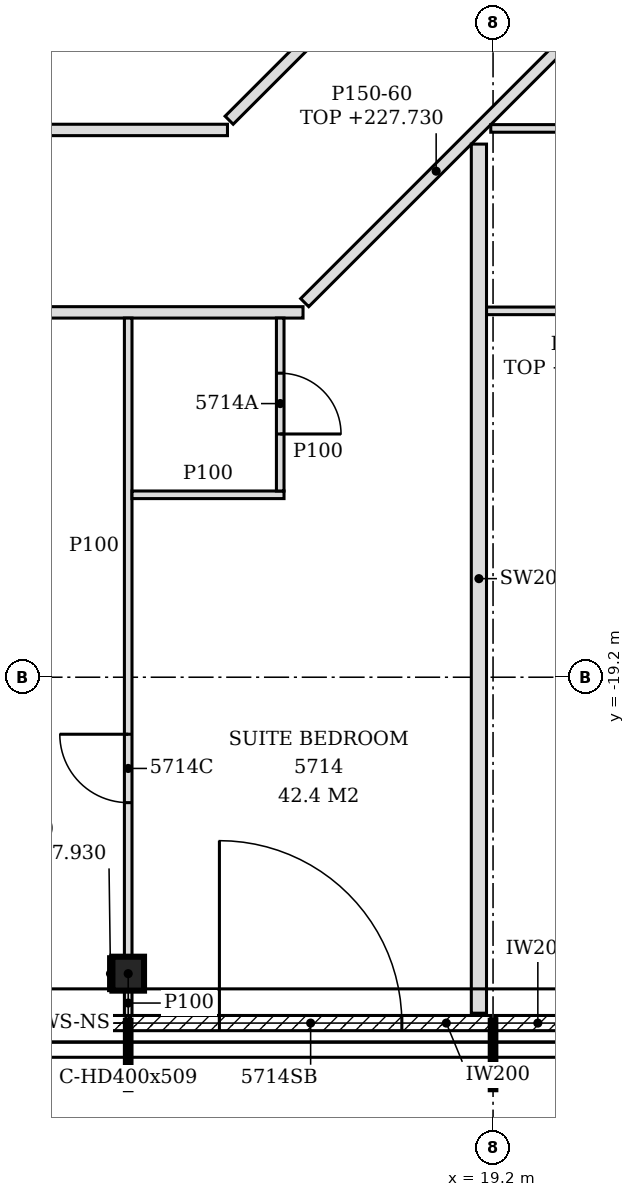
"""IFC4 building model, lengths in metres.
Left out: names, types, materials, properties, quantities, classifications, styles, units other than length and angle.
Written with IfcOpenShell. Run it as: python <this file> out.ifc"""

import sys

from ifc_helpers import new_model, si_unit, direction, frame, frame_2d, origin, origin_2d, place, context, subcontext, project, spatial, polyline, rectangle, i_section, outline, extrude, element, fill, save


model = new_model("IFC4")
c1 = context("Model", 3, precision=1e-05, world=origin(), true_north=direction((0.0, 1.0)))
c2 = subcontext(c1, "Body", "Model", "MODEL_VIEW")
j1 = project(units=[si_unit("LENGTHUNIT", "METRE"), si_unit("PLANEANGLEUNIT", "RADIAN")], contexts=[c1])
p1 = place(None, origin())
s1 = spatial("IfcSite", under=j1, at=p1, CompositionType="ELEMENT")
p2 = place(p1, origin())
s2 = spatial("IfcBuilding", under=s1, at=p2, CompositionType="ELEMENT")
p3 = place(p2, frame((0.0, 0.0, 225.0)))
s3 = spatial("IfcBuildingStorey", under=s2, at=p3, CompositionType="ELEMENT", Elevation=225.0)
p4 = place(p3, frame((14.4, -23.1, -0.15), z_axis=(0.0, 0.0, 1.0), x_axis=(1.0, 0.0, 0.0)))
e1 = element("IfcColumn", 1, at=p4, inside=s3, PredefinedType="COLUMN", context=c2, shape_type="SweptSolid", body=[
    extrude(i_section(OverallWidth=0.416, OverallDepth=0.446, WebThickness=0.039, FlangeThickness=0.063, FilletRadius=0.015, at=origin_2d()), origin(), (0.0, 0.0, 1.0), 3.6),
])
p5 = place(p3, frame((9.63, -23.75, 0.0), z_axis=(0.0, 0.0, 1.0), x_axis=(1.0, 0.0, 0.0)))
e2 = element("IfcWall", 2, at=p5, inside=s3, PredefinedType="NOTDEFINED", context=c2, shape_type="SweptSolid", body=[
    extrude(rectangle(XDim=4.74, YDim=0.2, at=frame_2d((2.37, 0.0))), origin(), (0.0, 0.0, 1.0), 3.45),
])
p6 = place(p5, frame((1.17, 0.0, 0.0)))
e3 = element("IfcOpeningElement", 3, at=p6, cuts=e2, PredefinedType="OPENING", context=c2, shape_type="SweptSolid", body=[
    extrude(rectangle(XDim=2.4, YDim=2.4, at=frame_2d((1.2, 1.2))), frame((0.0, 0.11, 0.0), z_axis=(0.0, -1.0, 0.0), x_axis=(1.0, 0.0, 0.0)), (0.0, 0.0, 1.0), 0.22),
])
p7 = place(p3, frame((14.43, -23.75, 0.0), z_axis=(0.0, 0.0, 1.0), x_axis=(1.0, 0.0, 0.0)))
e4 = element("IfcWall", 4, at=p7, inside=s3, PredefinedType="NOTDEFINED", context=c2, shape_type="SweptSolid", body=[
    extrude(rectangle(XDim=4.74, YDim=0.2, at=frame_2d((2.37, 0.0))), origin(), (0.0, 0.0, 1.0), 3.45),
])
p8 = place(p7, frame((1.17, 0.0, 0.0)))
e5 = element("IfcOpeningElement", 5, at=p8, cuts=e4, PredefinedType="OPENING", context=c2, shape_type="SweptSolid", body=[
    extrude(rectangle(XDim=2.4, YDim=2.4, at=frame_2d((1.2, 1.2))), frame((0.0, 0.11, 0.0), z_axis=(0.0, -1.0, 0.0), x_axis=(1.0, 0.0, 0.0)), (0.0, 0.0, 1.0), 0.22),
])
p9 = place(p3, frame((19.23, -23.75, 0.0), z_axis=(0.0, 0.0, 1.0), x_axis=(1.0, 0.0, 0.0)))
e6 = element("IfcWall", 6, at=p9, inside=s3, PredefinedType="NOTDEFINED", context=c2, shape_type="SweptSolid", body=[
    extrude(rectangle(XDim=4.626, YDim=0.2, at=frame_2d((2.313, 0.0))), origin(), (0.0, 0.0, 1.0), 3.45),
])
p10 = place(p9, frame((1.119, 0.0, 0.0)))
e7 = element("IfcOpeningElement", 7, at=p10, cuts=e6, PredefinedType="OPENING", context=c2, shape_type="SweptSolid", body=[
    extrude(rectangle(XDim=2.4, YDim=2.4, at=frame_2d((1.2, 1.2))), frame((0.0, 0.11, 0.0), z_axis=(0.0, -1.0, 0.0), x_axis=(1.0, 0.0, 0.0)), (0.0, 0.0, 1.0), 0.22),
])
p11 = place(p3, frame((14.4, -23.65, 0.0), z_axis=(0.0, 0.0, 1.0), x_axis=(0.0, 1.0, 0.0)))
e8 = element("IfcWall", 8, at=p11, inside=s3, PredefinedType="PARTITIONING", context=c2, shape_type="SweptSolid", body=[
    extrude(rectangle(XDim=0.327, YDim=0.1, at=frame_2d((0.164, 0.0))), origin(), (0.0, 0.0, 1.0), 3.45),
])
p12 = place(p3, frame((19.014, -23.62, 0.0), z_axis=(0.0, 0.0, 1.0), x_axis=(0.0, 1.0, 0.0)))
e9 = element("IfcWall", 9, at=p12, inside=s3, PredefinedType="PARTITIONING", context=c2, shape_type="SweptSolid", body=[
    extrude(outline(polyline([(0.0, 0.0), (11.434, 0.0), (11.434, 2.73), (0.64, 2.73), (0.638, 2.93), (0.37, 2.93), (0.368, 3.45), (0.0, 3.45), (0.0, 0.0)])), frame((0.0, 0.1, 0.0), z_axis=(0.0, -1.0, 0.0), x_axis=(1.0, 0.0, 0.0)), (0.0, 0.0, 1.0), 0.2),
])
p13 = place(p3, frame((14.4, -22.877, 0.0), z_axis=(0.0, 0.0, 1.0), x_axis=(0.0, 1.0, 0.0)))
e10 = element("IfcWall", 10, at=p13, inside=s3, PredefinedType="PARTITIONING", context=c2, shape_type="SweptSolid", body=[
    extrude(outline(polyline([(0.0, 0.0), (8.402, 0.0), (8.402, 2.88), (8.372, 2.88), (8.37, 3.45), (3.782, 3.45), (3.78, 2.88), (3.572, 2.88), (3.57, 3.45), (0.0, 3.45), (0.0, 0.0)])), frame((0.0, 0.05, 0.0), z_axis=(0.0, -1.0, 0.0), x_axis=(1.0, 0.0, 0.0)), (0.0, 0.0, 1.0), 0.1),
])
p14 = place(p13, frame((2.027, 0.0, 0.0)))
e11 = element("IfcOpeningElement", 11, at=p14, cuts=e10, PredefinedType="OPENING", context=c2, shape_type="SweptSolid", body=[
    extrude(rectangle(XDim=0.9, YDim=2.1, at=frame_2d((0.45, 1.05))), frame((0.0, 0.06, 0.0), z_axis=(0.0, -1.0, 0.0), x_axis=(1.0, 0.0, 0.0)), (0.0, 0.0, 1.0), 0.12),
])
p15 = place(p3, frame((14.45, -16.8, 0.0), z_axis=(0.0, 0.0, 1.0), x_axis=(1.0, 0.0, 0.0)))
e12 = element("IfcWall", 12, at=p15, inside=s3, PredefinedType="PARTITIONING", context=c2, shape_type="SweptSolid", body=[
    extrude(rectangle(XDim=2.0, YDim=0.1, at=frame_2d((1.0, 0.0))), origin(), (0.0, 0.0, 1.0), 3.45),
])
p16 = place(p3, frame((16.4, -16.75, 0.0), z_axis=(0.0, 0.0, 1.0), x_axis=(0.0, 1.0, 0.0)))
e13 = element("IfcWall", 13, at=p16, inside=s3, PredefinedType="PARTITIONING", context=c2, shape_type="SweptSolid", body=[
    extrude(outline(polyline([(0.0, 0.0), (2.275, 0.0), (2.275, 2.88), (2.245, 2.88), (2.243, 3.45), (0.0, 3.45), (0.0, 0.0)])), frame((0.0, 0.05, 0.0), z_axis=(0.0, -1.0, 0.0), x_axis=(1.0, 0.0, 0.0)), (0.0, 0.0, 1.0), 0.1),
])
p17 = place(p16, frame((0.75, 0.0, 0.0)))
e14 = element("IfcOpeningElement", 14, at=p17, cuts=e13, PredefinedType="OPENING", context=c2, shape_type="SweptSolid", body=[
    extrude(rectangle(XDim=0.8, YDim=2.1, at=frame_2d((0.4, 1.05))), frame((0.0, 0.06, 0.0), z_axis=(0.0, -1.0, 0.0), x_axis=(1.0, 0.0, 0.0)), (0.0, 0.0, 1.0), 0.12),
])
p18 = place(p3, frame((-4.326, -14.4, 0.0), z_axis=(0.0, 0.0, 1.0), x_axis=(1.0, 0.0, 0.0)))
e15 = element("IfcWall", 15, at=p18, inside=s3, PredefinedType="PARTITIONING", context=c2, shape_type="SweptSolid", body=[
    extrude(outline(polyline([(0.0, 0.0), (21.026, 0.0), (21.026, 2.88), (11.676, 2.88), (11.674, 2.73), (11.376, 2.73), (11.374, 2.88), (1.369, 2.88), (1.367, 2.63), (0.229, 2.63), (0.227, 2.88), (0.0, 2.88), (0.0, 0.0)])), frame((0.0, 0.075, 0.0), z_axis=(0.0, -1.0, 0.0), x_axis=(1.0, 0.0, 0.0)), (0.0, 0.0, 1.0), 0.15),
])
p19 = place(p18, frame((5.169, 0.0, 0.0)))
e16 = element("IfcOpeningElement", 16, at=p19, cuts=e15, PredefinedType="OPENING", context=c2, shape_type="SweptSolid", body=[
    extrude(rectangle(XDim=0.9, YDim=2.1, at=frame_2d((0.45, 1.05))), frame((0.0, 0.085, 0.0), z_axis=(0.0, -1.0, 0.0), x_axis=(1.0, 0.0, 0.0)), (0.0, 0.0, 1.0), 0.17),
])
p20 = place(p18, frame((15.969, 0.0, 0.0)))
e17 = element("IfcOpeningElement", 17, at=p20, cuts=e15, PredefinedType="OPENING", context=c2, shape_type="SweptSolid", body=[
    extrude(rectangle(XDim=0.9, YDim=2.1, at=frame_2d((0.45, 1.05))), frame((0.0, 0.085, 0.0), z_axis=(0.0, -1.0, 0.0), x_axis=(1.0, 0.0, 0.0)), (0.0, 0.0, 1.0), 0.17),
])
p21 = place(p3, frame((19.114, -14.38, 0.0), z_axis=(0.0, 0.0, 1.0), x_axis=(1.0, 0.0, 0.0)))
e18 = element("IfcWall", 18, at=p21, inside=s3, PredefinedType="PARTITIONING", context=c2, shape_type="SweptSolid", body=[
    extrude(outline(polyline([(0.0, 0.0), (2.35, 0.0), (2.35, 2.88), (0.236, 2.88), (0.234, 2.73), (0.0, 2.73), (0.0, 0.0)])), frame((0.0, 0.05, 0.0), z_axis=(0.0, -1.0, 0.0), x_axis=(1.0, 0.0, 0.0)), (0.0, 0.0, 1.0), 0.1),
])
p22 = place(p3, frame((16.722, -14.272, 0.0), z_axis=(0.0, 0.0, 1.0), x_axis=(0.707106781187, 0.707106781187, 0.0)))
e19 = element("IfcWall", 19, at=p22, inside=s3, PredefinedType="PARTITIONING", context=c2, shape_type="SweptSolid", body=[
    extrude(rectangle(XDim=20.049, YDim=0.15, at=frame_2d((10.025, 0.0))), origin(), (0.0, 0.0, 1.0), 2.73),
])
p23 = place(p22, frame((4.892, 0.0, 0.0)))
e20 = element("IfcOpeningElement", 20, at=p23, cuts=e19, PredefinedType="OPENING", context=c2, shape_type="SweptSolid", body=[
    extrude(rectangle(XDim=0.9, YDim=2.1, at=frame_2d((0.45, 1.05))), frame((0.0, 0.085, 0.0), z_axis=(0.0, -1.0, 0.0), x_axis=(1.0, 0.0, 0.0)), (0.0, 0.0, 1.0), 0.17),
])
p24 = place(p22, frame((10.042, 0.0, 0.0)))
e21 = element("IfcOpeningElement", 21, at=p24, cuts=e19, PredefinedType="OPENING", context=c2, shape_type="SweptSolid", body=[
    extrude(rectangle(XDim=0.9, YDim=2.1, at=frame_2d((0.45, 1.05))), frame((0.0, 0.085, 0.0), z_axis=(0.0, -1.0, 0.0), x_axis=(1.0, 0.0, 0.0)), (0.0, 0.0, 1.0), 0.17),
])
p25 = place(p22, frame((14.443, 0.0, 0.0)))
e22 = element("IfcOpeningElement", 22, at=p25, cuts=e19, PredefinedType="OPENING", context=c2, shape_type="SweptSolid", body=[
    extrude(rectangle(XDim=0.9, YDim=2.1, at=frame_2d((0.45, 1.05))), frame((0.0, 0.085, 0.0), z_axis=(0.0, -1.0, 0.0), x_axis=(1.0, 0.0, 0.0)), (0.0, 0.0, 1.0), 0.17),
])
p26 = place(p22, frame((17.837, 0.0, 0.0)))
e23 = element("IfcOpeningElement", 23, at=p26, cuts=e19, PredefinedType="OPENING", context=c2, shape_type="SweptSolid", body=[
    extrude(rectangle(XDim=0.9, YDim=2.1, at=frame_2d((0.45, 1.05))), frame((0.0, 0.085, 0.0), z_axis=(0.0, -1.0, 0.0), x_axis=(1.0, 0.0, 0.0)), (0.0, 0.0, 1.0), 0.17),
])
p27 = place(p3, frame((7.125, -12.0, 0.0), z_axis=(0.0, 0.0, 1.0), x_axis=(1.0, 0.0, 0.0)))
e24 = element("IfcWall", 24, at=p27, inside=s3, PredefinedType="PARTITIONING", context=c2, shape_type="SweptSolid", body=[
    extrude(outline(polyline([(0.0, 0.0), (8.581, 0.0), (8.581, 3.45), (0.225, 3.45), (0.223, 2.73), (0.0, 2.73), (0.0, 0.0)])), frame((0.0, 0.075, 0.0), z_axis=(0.0, -1.0, 0.0), x_axis=(1.0, 0.0, 0.0)), (0.0, 0.0, 1.0), 0.15),
])
p28 = place(p27, frame((1.325, 0.0, 0.0)))
e25 = element("IfcOpeningElement", 25, at=p28, cuts=e24, PredefinedType="OPENING", context=c2, shape_type="SweptSolid", body=[
    extrude(rectangle(XDim=0.8, YDim=2.1, at=frame_2d((0.4, 1.05))), frame((0.0, 0.085, 0.0), z_axis=(0.0, -1.0, 0.0), x_axis=(1.0, 0.0, 0.0)), (0.0, 0.0, 1.0), 0.17),
])
p29 = place(p3, frame((19.17, -11.98, 0.0), z_axis=(0.0, 0.0, 1.0), x_axis=(1.0, 0.0, 0.0)))
e26 = element("IfcWall", 26, at=p29, inside=s3, PredefinedType="PARTITIONING", context=c2, shape_type="SweptSolid", body=[
    extrude(outline(polyline([(0.0, 0.0), (2.294, 0.0), (2.294, 3.45), (0.18, 3.45), (0.178, 2.73), (0.0, 2.73), (0.0, 0.0)])), frame((0.0, 0.05, 0.0), z_axis=(0.0, -1.0, 0.0), x_axis=(1.0, 0.0, 0.0)), (0.0, 0.0, 1.0), 0.1),
])
p30 = place(p3, frame((15.728, -11.872, 0.0), z_axis=(0.0, 0.0, 1.0), x_axis=(0.707080416772, 0.707133144618, 0.0)))
e27 = element("IfcWall", 27, at=p30, inside=s3, PredefinedType="PARTITIONING", context=c2, shape_type="SweptSolid", body=[
    extrude(rectangle(XDim=4.63, YDim=0.15, at=frame_2d((2.315, 0.0))), origin(), (0.0, 0.0, 1.0), 3.45),
])
p31 = place(p3, frame((14.167, -23.323, 0.0), z_axis=(0.0, 0.0, 1.0), x_axis=(0.0, 1.0, 0.0)))
e28 = element("IfcWall", 28, at=p31, inside=s3, PredefinedType="PARTITIONING", context=c2, shape_type="SweptSolid", body=[
    extrude(rectangle(XDim=0.446, YDim=0.05, at=frame_2d((0.223, 0.0))), origin(), (0.0, 0.0, 1.0), 2.93),
])
p32 = place(p8, origin())
e29 = element("IfcDoor", 29, at=p32, inside=s3, OperationType="SINGLE_SWING_LEFT", PredefinedType="DOOR", context=c2, shape_type="SweptSolid", body=[
    extrude(rectangle(XDim=2.4, YDim=2.4, at=frame_2d((1.2, 1.2))), frame((0.0, 0.025, 0.0), z_axis=(0.0, -1.0, 0.0), x_axis=(1.0, 0.0, 0.0)), (0.0, 0.0, 1.0), 0.05),
])
fill(e5, e29)
p33 = place(p14, origin())
e30 = element("IfcDoor", 30, at=p33, inside=s3, OperationType="SINGLE_SWING_RIGHT", PredefinedType="DOOR", context=c2, shape_type="SweptSolid", body=[
    extrude(rectangle(XDim=0.9, YDim=2.1, at=frame_2d((0.45, 1.05))), frame((0.0, 0.025, 0.0), z_axis=(0.0, -1.0, 0.0), x_axis=(1.0, 0.0, 0.0)), (0.0, 0.0, 1.0), 0.05),
])
fill(e11, e30)
p34 = place(p17, frame((0.8, 0.0, 0.0), z_axis=(0.0, 0.0, 1.0), x_axis=(-1.0, 0.0, 0.0)))
e31 = element("IfcDoor", 31, at=p34, inside=s3, OperationType="SINGLE_SWING_RIGHT", PredefinedType="DOOR", context=c2, shape_type="SweptSolid", body=[
    extrude(rectangle(XDim=0.8, YDim=2.1, at=frame_2d((0.4, 1.05))), frame((0.0, 0.025, 0.0), z_axis=(0.0, -1.0, 0.0), x_axis=(1.0, 0.0, 0.0)), (0.0, 0.0, 1.0), 0.05),
])
fill(e14, e31)
save(model, sys.argv[1])
